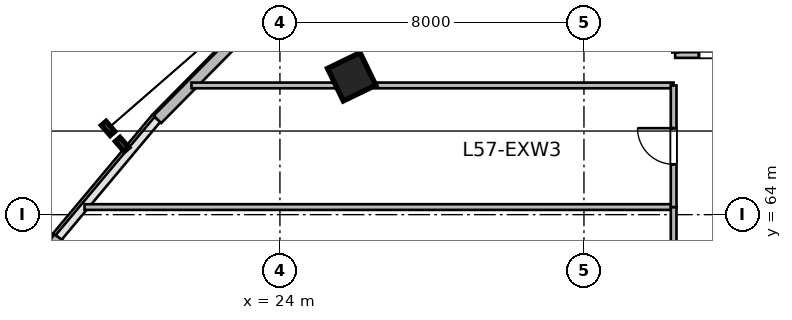
"""IFC4 building model, lengths in metres.
Left out: names, types, materials, properties, quantities, classifications, styles, units other than length and angle.
Written with IfcOpenShell. Run it as: python <this file> out.ifc"""

import sys

from ifc_helpers import new_model, si_unit, direction, frame, frame_2d, origin, origin_2d, place, context, subcontext, project, spatial, rectangle, extrude, source, transform, mapped, element, fill, save


model = new_model("IFC4")
c1 = context("Model", 3, precision=1e-05, world=origin(), true_north=direction((0.0, 1.0)))
c2 = subcontext(c1, "Body", "Model", "MODEL_VIEW")
j1 = project(units=[si_unit("LENGTHUNIT", "METRE"), si_unit("PLANEANGLEUNIT", "RADIAN")], contexts=[c1])
p1 = place(None, origin())
s1 = spatial("IfcSite", under=j1, at=p1, CompositionType="ELEMENT")
p2 = place(p1, origin())
s2 = spatial("IfcBuilding", under=s1, at=p2, CompositionType="ELEMENT")
p3 = place(p2, frame((0.0, 0.0, 235.2)))
s3 = spatial("IfcBuildingStorey", under=s2, at=p3, CompositionType="ELEMENT", Elevation=235.2)
m1 = source(origin(), c2, "Body", "SweptSolid", [
    extrude(rectangle(XDim=0.95, YDim=0.95, at=origin_2d()), origin(), (0.0, 0.0, 1.0), 3.9),
])
p4 = place(p3, frame((25.888, 67.627, 0.0), z_axis=(0.0, 0.0, 1.0), x_axis=(-0.436173672171, 0.899862504889, 0.0)))
e1 = element("IfcColumn", 1, at=p4, inside=s3, PredefinedType="COLUMN", context=c2, shape_type="MappedRepresentation", body=[
    mapped(m1, transform((0.0, 0.0, 0.0), scale=1.0)),
])
m2 = source(origin(), c2, "Body", "SweptSolid", [
    extrude(rectangle(XDim=4.149, YDim=0.28, at=frame_2d((2.074, 0.0))), origin(), (0.0, 0.0, 1.0), 3.65),
])
p5 = place(p3, frame((15.771, 60.019, 0.0), z_axis=(0.0, 0.0, 1.0), x_axis=(0.579622789827, 0.814884913048, 0.0)))
e2 = element("IfcWall", 2, at=p5, inside=s3, PredefinedType="SOLIDWALL", context=c2, shape_type="MappedRepresentation", body=[
    mapped(m2, transform((0.0, 0.0, 0.0), scale=1.0)),
])
m3 = source(origin(), c2, "Body", "SweptSolid", [
    extrude(rectangle(XDim=3.955, YDim=0.28, at=frame_2d((1.978, 0.0))), origin(), (0.0, 0.0, 1.0), 3.65),
])
p6 = place(p3, frame((20.776, 66.507, 0.0), z_axis=(0.0, 0.0, 1.0), x_axis=(0.702710517474, 0.711475880569, 0.0)))
e3 = element("IfcWall", 3, at=p6, inside=s3, PredefinedType="SOLIDWALL", context=c2, shape_type="MappedRepresentation", body=[
    mapped(m3, transform((0.0, 0.0, 0.0), scale=1.0)),
])
m4 = source(origin(), c2, "Body", "SweptSolid", [
    extrude(rectangle(XDim=2.1, YDim=0.15, at=frame_2d((1.05, 0.0))), origin(), (0.0, 0.0, 1.0), 3.65),
])
p7 = place(p3, frame((34.4, 68.2, 0.0), z_axis=(0.0, 0.0, 1.0), x_axis=(1.0, 0.0, 0.0)))
e4 = element("IfcWall", 4, at=p7, inside=s3, PredefinedType="PARTITIONING", context=c2, shape_type="MappedRepresentation", body=[
    mapped(m4, transform((0.0, 0.0, 0.0), scale=1.0)),
])
p8 = place(p7, frame((0.625, 0.0, 0.0)))
e5 = element("IfcOpeningElement", 5, at=p8, cuts=e4, PredefinedType="OPENING", context=c2, shape_type="SweptSolid", body=[
    extrude(rectangle(XDim=0.85, YDim=2.1, at=frame_2d((0.425, 1.05))), frame((0.0, 0.085, 0.0), z_axis=(0.0, -1.0, 0.0), x_axis=(1.0, 0.0, 0.0)), (0.0, 0.0, 1.0), 0.17),
])
m5 = source(origin(), c2, "Body", "SweptSolid", [
    extrude(rectangle(XDim=3.845, YDim=0.15, at=frame_2d((1.922, 0.0))), origin(), (0.0, 0.0, 1.0), 3.65),
])
p9 = place(p3, frame((34.4, 68.268, 0.0), z_axis=(0.0, 0.0, 1.0), x_axis=(0.0, 1.0, 0.0)))
e6 = element("IfcWall", 6, at=p9, inside=s3, PredefinedType="PARTITIONING", context=c2, shape_type="MappedRepresentation", body=[
    mapped(m5, transform((0.0, 0.0, 0.0), scale=1.0)),
])
m6 = source(origin(), c2, "Body", "SweptSolid", [
    extrude(rectangle(XDim=15.501, YDim=0.15, at=frame_2d((7.751, 0.0))), origin(), (0.0, 0.0, 1.0), 3.65),
])
p10 = place(p3, frame((18.859, 64.2, 0.0), z_axis=(0.0, 0.0, 1.0), x_axis=(1.0, 0.0, 0.0)))
e7 = element("IfcWall", 7, at=p10, inside=s3, PredefinedType="PARTITIONING", context=c2, shape_type="MappedRepresentation", body=[
    mapped(m6, transform((0.0, 0.0, 0.0), scale=1.0)),
])
m7 = source(origin(), c2, "Body", "SweptSolid", [
    extrude(rectangle(XDim=3.2, YDim=0.15, at=frame_2d((1.6, 0.0))), origin(), (0.0, 0.0, 1.0), 3.65),
])
p11 = place(p3, frame((34.36, 61.0, 0.0), z_axis=(0.0, 0.0, 1.0), x_axis=(0.0, 1.0, 0.0)))
e8 = element("IfcWall", 8, at=p11, inside=s3, PredefinedType="PARTITIONING", context=c2, shape_type="MappedRepresentation", body=[
    mapped(m7, transform((0.0, 0.0, 0.0), scale=1.0)),
])
p12 = place(p11, frame((1.125, 0.0, 0.0)))
e9 = element("IfcOpeningElement", 9, at=p12, cuts=e8, PredefinedType="OPENING", context=c2, shape_type="SweptSolid", body=[
    extrude(rectangle(XDim=0.95, YDim=2.1, at=frame_2d((0.475, 1.05))), frame((0.0, 0.085, 0.0), z_axis=(0.0, -1.0, 0.0), x_axis=(1.0, 0.0, 0.0)), (0.0, 0.0, 1.0), 0.17),
])
m8 = source(origin(), c2, "Body", "SweptSolid", [
    extrude(rectangle(XDim=12.688, YDim=0.15, at=frame_2d((6.344, 0.0))), origin(), (0.0, 0.0, 1.0), 3.65),
])
p13 = place(p3, frame((21.672, 67.4, 0.0), z_axis=(0.0, 0.0, 1.0), x_axis=(1.0, 0.0, 0.0)))
e10 = element("IfcWall", 10, at=p13, inside=s3, PredefinedType="PARTITIONING", context=c2, shape_type="MappedRepresentation", body=[
    mapped(m8, transform((0.0, 0.0, 0.0), scale=1.0)),
])
p14 = place(p3, frame((34.36, 64.2, 0.0), z_axis=(0.0, 0.0, 1.0), x_axis=(0.0, 1.0, 0.0)))
e11 = element("IfcWall", 11, at=p14, inside=s3, PredefinedType="PARTITIONING", context=c2, shape_type="MappedRepresentation", body=[
    mapped(m7, transform((0.0, 0.0, 0.0), scale=1.0)),
])
p15 = place(p14, frame((1.125, 0.0, 0.0)))
e12 = element("IfcOpeningElement", 12, at=p15, cuts=e11, PredefinedType="OPENING", context=c2, shape_type="SweptSolid", body=[
    extrude(rectangle(XDim=0.95, YDim=2.1, at=frame_2d((0.475, 1.05))), frame((0.0, 0.085, 0.0), z_axis=(0.0, -1.0, 0.0), x_axis=(1.0, 0.0, 0.0)), (0.0, 0.0, 1.0), 0.17),
])
m9 = source(origin(), c2, "Body", "SweptSolid", [
    extrude(rectangle(XDim=0.85, YDim=2.1, at=frame_2d((0.425, 1.05))), frame((0.0, 0.025, 0.0), z_axis=(0.0, -1.0, 0.0), x_axis=(1.0, 0.0, 0.0)), (0.0, 0.0, 1.0), 0.05),
])
p16 = place(p8, origin())
e13 = element("IfcDoor", 13, at=p16, inside=s3, OperationType="SINGLE_SWING_RIGHT", PredefinedType="DOOR", context=c2, shape_type="MappedRepresentation", body=[
    mapped(m9, transform((0.0, 0.0, 0.0), scale=1.0)),
])
fill(e5, e13)
m10 = source(origin(), c2, "Body", "SweptSolid", [
    extrude(rectangle(XDim=0.95, YDim=2.1, at=frame_2d((0.475, 1.05))), frame((0.0, 0.025, 0.0), z_axis=(0.0, -1.0, 0.0), x_axis=(1.0, 0.0, 0.0)), (0.0, 0.0, 1.0), 0.05),
])
p17 = place(p15, origin())
e14 = element("IfcDoor", 14, at=p17, inside=s3, OperationType="SINGLE_SWING_RIGHT", PredefinedType="DOOR", context=c2, shape_type="MappedRepresentation", body=[
    mapped(m10, transform((0.0, 0.0, 0.0), scale=1.0)),
])
fill(e12, e14)
save(model, sys.argv[1])
